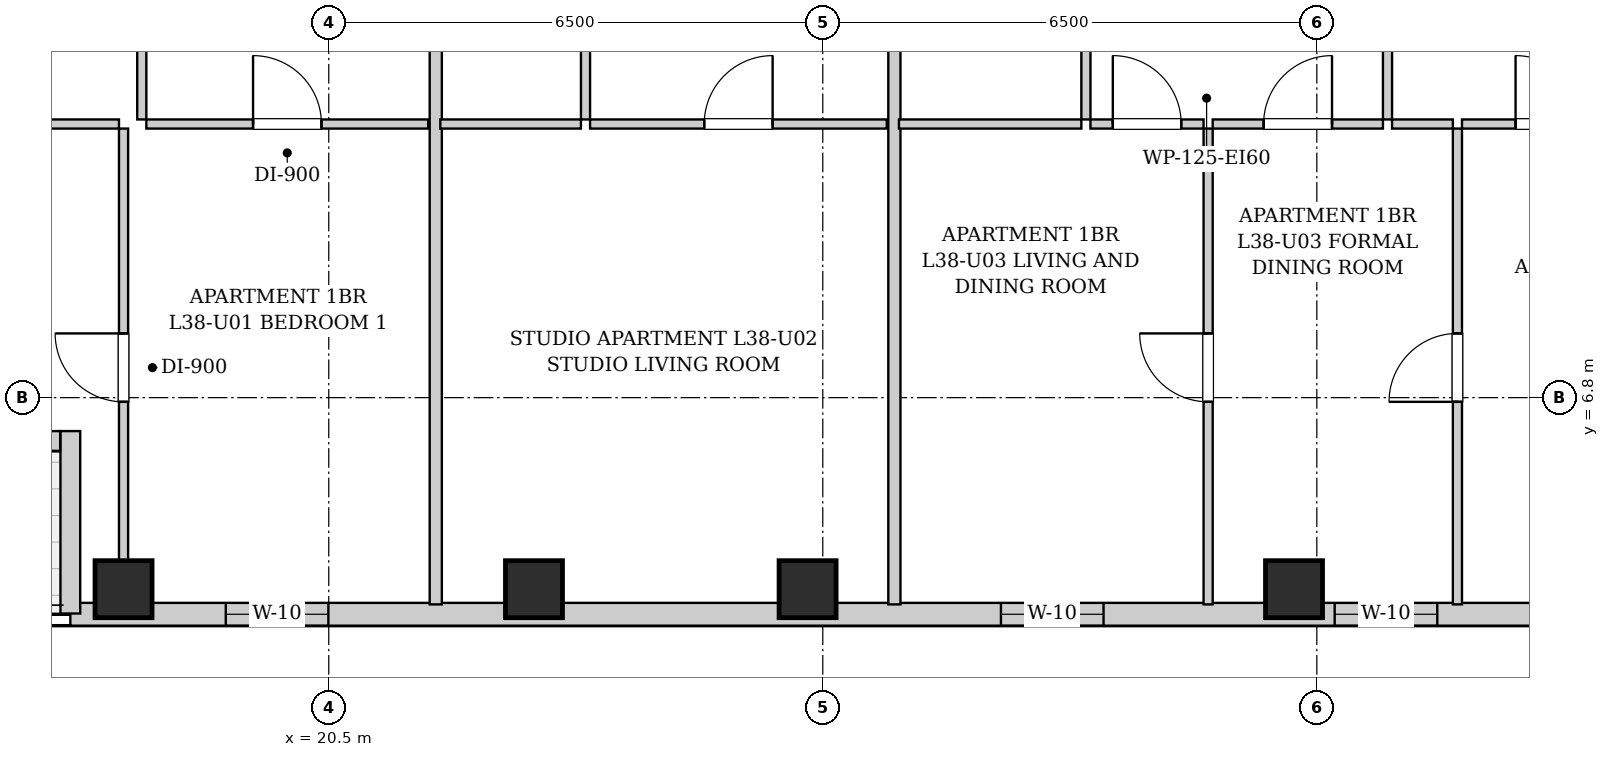
"""IFC4 building model, lengths in metres.
Left out: names, types, materials, properties, quantities, classifications, styles, units other than length and angle.
Written with IfcOpenShell. Run it as: python <this file> out.ifc"""

import sys

from ifc_helpers import new_model, si_unit, direction, frame, frame_2d, origin, origin_2d, place, context, subcontext, project, spatial, rectangle, extrude, element, fill, save


model = new_model("IFC4")
c1 = context("Model", 3, precision=1e-05, world=origin(), true_north=direction((0.0, 1.0)))
c2 = subcontext(c1, "Body", "Model", "MODEL_VIEW")
j1 = project(units=[si_unit("LENGTHUNIT", "METRE"), si_unit("PLANEANGLEUNIT", "RADIAN")], contexts=[c1])
p1 = place(None, origin())
s1 = spatial("IfcSite", under=j1, at=p1, CompositionType="ELEMENT")
p2 = place(p1, origin())
s2 = spatial("IfcBuilding", under=s1, at=p2, CompositionType="ELEMENT")
p3 = place(p2, frame((0.0, 0.0, 134.15)))
s3 = spatial("IfcBuildingStorey", under=s2, at=p3, CompositionType="ELEMENT", Elevation=134.15)
for number, where, z_axis, x_axis in (
    (1, (17.8, 4.28, 0.0), (0.0, 0.0, 1.0), (1.0, 0.0, 0.0)),
    (2, (23.2, 4.28, 0.0), (0.0, 0.0, 1.0), (1.0, 0.0, 0.0)),
    (3, (26.8, 4.28, 0.0), (0.0, 0.0, 1.0), (1.0, 0.0, 0.0)),
    (4, (33.2, 4.28, 0.0), (0.0, 0.0, 1.0), (1.0, 0.0, 0.0)),
):
    element("IfcColumn", number, at=place(p3, frame(where, z_axis=z_axis, x_axis=x_axis)), inside=s3, PredefinedType="COLUMN", context=c2, shape_type="SweptSolid", body=[
        extrude(rectangle(XDim=0.75, YDim=0.75, at=origin_2d()), origin(), (0.0, 0.0, 1.0), 3.25),
    ])
p4 = place(p3, frame((37.8, 3.95, 0.0), z_axis=(0.0, 0.0, 1.0), x_axis=(-1.0, 0.0, 0.0)))
e5 = element("IfcWall", 5, at=p4, inside=s3, PredefinedType="SOLIDWALL", context=c2, shape_type="SweptSolid", body=[
    extrude(rectangle(XDim=20.7, YDim=0.3, at=frame_2d((10.35, 0.0))), origin(), (0.0, 0.0, 1.0), 2.99),
])
p5 = place(p4, frame((17.305, 0.0, 0.55)))
e6 = element("IfcOpeningElement", 6, at=p5, cuts=e5, PredefinedType="OPENING", context=c2, shape_type="SweptSolid", body=[
    extrude(rectangle(XDim=1.35, YDim=1.2, at=frame_2d((0.675, 0.6))), frame((0.0, 0.16, 0.0), z_axis=(0.0, -1.0, 0.0), x_axis=(1.0, 0.0, 0.0)), (0.0, 0.0, 1.0), 0.32),
])
p6 = place(p4, frame((7.106, 0.0, 0.55)))
e7 = element("IfcOpeningElement", 7, at=p6, cuts=e5, PredefinedType="OPENING", context=c2, shape_type="SweptSolid", body=[
    extrude(rectangle(XDim=1.35, YDim=1.2, at=frame_2d((0.675, 0.6))), frame((0.0, 0.16, 0.0), z_axis=(0.0, -1.0, 0.0), x_axis=(1.0, 0.0, 0.0)), (0.0, 0.0, 1.0), 0.32),
])
p7 = place(p4, frame((2.715, 0.0, 0.55)))
e8 = element("IfcOpeningElement", 8, at=p7, cuts=e5, PredefinedType="OPENING", context=c2, shape_type="SweptSolid", body=[
    extrude(rectangle(XDim=1.35, YDim=1.2, at=frame_2d((0.675, 0.6))), frame((0.0, 0.16, 0.0), z_axis=(0.0, -1.0, 0.0), x_axis=(1.0, 0.0, 0.0)), (0.0, 0.0, 1.0), 0.32),
])
p8 = place(p3, frame((17.1, 3.96, 0.0), z_axis=(0.0, 0.0, 1.0), x_axis=(0.0, 1.0, 0.0)))
e9 = element("IfcWall", 9, at=p8, inside=s3, PredefinedType="SOLIDWALL", context=c2, shape_type="SweptSolid", body=[
    extrude(rectangle(XDim=2.4, YDim=0.26, at=frame_2d((1.2, 0.0))), origin(), (0.0, 0.0, 1.0), 2.99),
])
p9 = place(p3, frame((16.966, 6.23, 0.0), z_axis=(0.0, 0.0, 1.0), x_axis=(-1.0, 0.0, 0.0)))
e10 = element("IfcWall", 10, at=p9, inside=s3, PredefinedType="SOLIDWALL", context=c2, shape_type="SweptSolid", body=[
    extrude(rectangle(XDim=4.882, YDim=0.26, at=frame_2d((2.441, 0.0))), origin(), (0.0, 0.0, 1.0), 2.99),
])
p10 = place(p9, frame((1.891, 0.0, 0.0)))
e11 = element("IfcOpeningElement", 11, at=p10, cuts=e10, PredefinedType="OPENING", context=c2, shape_type="SweptSolid", body=[
    extrude(rectangle(XDim=1.1, YDim=2.0, at=frame_2d((0.55, 1.0))), frame((0.0, 0.14, 0.0), z_axis=(0.0, -1.0, 0.0), x_axis=(1.0, 0.0, 0.0)), (0.0, 0.0, 1.0), 0.28),
])
p11 = place(p9, frame((0.881, 0.0, 0.55)))
e12 = element("IfcOpeningElement", 12, at=p11, cuts=e10, PredefinedType="OPENING", context=c2, shape_type="SweptSolid", body=[
    extrude(rectangle(XDim=0.85, YDim=1.2, at=frame_2d((0.425, 0.6))), frame((0.0, 0.14, 0.0), z_axis=(0.0, -1.0, 0.0), x_axis=(1.0, 0.0, 0.0)), (0.0, 0.0, 1.0), 0.28),
])
p12 = place(p3, frame((18.04, 10.46, 0.0), z_axis=(0.0, 0.0, 1.0), x_axis=(0.0, 1.0, 0.0)))
e13 = element("IfcWall", 13, at=p12, inside=s3, PredefinedType="PARTITIONING", context=c2, shape_type="SweptSolid", body=[
    extrude(rectangle(XDim=2.85, YDim=0.12, at=frame_2d((1.425, 0.0))), origin(), (0.0, 0.0, 1.0), 2.99),
])
p13 = place(p12, frame((0.975, 0.0, 0.0)))
e14 = element("IfcOpeningElement", 14, at=p13, cuts=e13, PredefinedType="OPENING", context=c2, shape_type="SweptSolid", body=[
    extrude(rectangle(XDim=0.9, YDim=2.05, at=frame_2d((0.45, 1.025))), frame((0.0, 0.07, 0.0), z_axis=(0.0, -1.0, 0.0), x_axis=(1.0, 0.0, 0.0)), (0.0, 0.0, 1.0), 0.14),
])
p14 = place(p3, frame((13.8, 10.4, 0.0), z_axis=(0.0, 0.0, 1.0), x_axis=(1.0, 0.0, 0.0)))
e15 = element("IfcWall", 15, at=p14, inside=s3, PredefinedType="PARTITIONING", context=c2, shape_type="SweptSolid", body=[
    extrude(rectangle(XDim=3.94, YDim=0.12, at=frame_2d((1.97, 0.0))), origin(), (0.0, 0.0, 1.0), 2.99),
])
p15 = place(p14, frame((1.52, 0.0, 0.0)))
e16 = element("IfcOpeningElement", 16, at=p15, cuts=e15, PredefinedType="OPENING", context=c2, shape_type="SweptSolid", body=[
    extrude(rectangle(XDim=0.9, YDim=2.05, at=frame_2d((0.45, 1.025))), frame((0.0, 0.07, 0.0), z_axis=(0.0, -1.0, 0.0), x_axis=(1.0, 0.0, 0.0)), (0.0, 0.0, 1.0), 0.14),
])
p16 = place(p3, frame((18.1, 10.4, 0.0), z_axis=(0.0, 0.0, 1.0), x_axis=(1.0, 0.0, 0.0)))
e17 = element("IfcWall", 17, at=p16, inside=s3, PredefinedType="PARTITIONING", context=c2, shape_type="SweptSolid", body=[
    extrude(rectangle(XDim=3.708, YDim=0.12, at=frame_2d((1.854, 0.0))), origin(), (0.0, 0.0, 1.0), 2.99),
])
p17 = place(p16, frame((1.404, 0.0, 0.0)))
e18 = element("IfcOpeningElement", 18, at=p17, cuts=e17, PredefinedType="OPENING", context=c2, shape_type="SweptSolid", body=[
    extrude(rectangle(XDim=0.9, YDim=2.05, at=frame_2d((0.45, 1.025))), frame((0.0, 0.07, 0.0), z_axis=(0.0, -1.0, 0.0), x_axis=(1.0, 0.0, 0.0)), (0.0, 0.0, 1.0), 0.14),
])
p18 = place(p3, frame((17.8, 4.08, 0.0), z_axis=(0.0, 0.0, 1.0), x_axis=(0.0, 1.0, 0.0)))
e19 = element("IfcWall", 19, at=p18, inside=s3, PredefinedType="PARTITIONING", context=c2, shape_type="SweptSolid", body=[
    extrude(rectangle(XDim=6.26, YDim=0.12, at=frame_2d((3.13, 0.0))), origin(), (0.0, 0.0, 1.0), 2.426),
])
p19 = place(p18, frame((2.665, 0.0, 0.0)))
e20 = element("IfcOpeningElement", 20, at=p19, cuts=e19, PredefinedType="OPENING", context=c2, shape_type="SweptSolid", body=[
    extrude(rectangle(XDim=0.9, YDim=2.05, at=frame_2d((0.45, 1.025))), frame((0.0, 0.07, 0.0), z_axis=(0.0, -1.0, 0.0), x_axis=(1.0, 0.0, 0.0)), (0.0, 0.0, 1.0), 0.14),
])
p20 = place(p3, frame((21.908, 4.08, 0.0), z_axis=(0.0, 0.0, 1.0), x_axis=(0.0, 1.0, 0.0)))
e21 = element("IfcWall", 21, at=p20, inside=s3, PredefinedType="PARTITIONING", context=c2, shape_type="SweptSolid", body=[
    extrude(rectangle(XDim=9.23, YDim=0.16, at=frame_2d((4.615, 0.0))), origin(), (0.0, 0.0, 1.0), 2.99),
])
p21 = place(p3, frame((23.878, 10.46, 0.0), z_axis=(0.0, 0.0, 1.0), x_axis=(0.0, 1.0, 0.0)))
e22 = element("IfcWall", 22, at=p21, inside=s3, PredefinedType="PARTITIONING", context=c2, shape_type="SweptSolid", body=[
    extrude(rectangle(XDim=2.85, YDim=0.12, at=frame_2d((1.425, 0.0))), origin(), (0.0, 0.0, 1.0), 2.99),
])
p22 = place(p21, frame((0.995, 0.0, 0.0)))
e23 = element("IfcOpeningElement", 23, at=p22, cuts=e22, PredefinedType="OPENING", context=c2, shape_type="SweptSolid", body=[
    extrude(rectangle(XDim=0.86, YDim=2.05, at=frame_2d((0.43, 1.025))), frame((0.0, 0.07, 0.0), z_axis=(0.0, -1.0, 0.0), x_axis=(1.0, 0.0, 0.0)), (0.0, 0.0, 1.0), 0.14),
])
p23 = place(p3, frame((21.968, 10.4, 0.0), z_axis=(0.0, 0.0, 1.0), x_axis=(1.0, 0.0, 0.0)))
e24 = element("IfcWall", 24, at=p23, inside=s3, PredefinedType="PARTITIONING", context=c2, shape_type="SweptSolid", body=[
    extrude(rectangle(XDim=1.85, YDim=0.12, at=frame_2d((0.925, 0.0))), origin(), (0.0, 0.0, 1.0), 2.99),
])
p24 = place(p3, frame((23.938, 10.4, 0.0), z_axis=(0.0, 0.0, 1.0), x_axis=(1.0, 0.0, 0.0)))
e25 = element("IfcWall", 25, at=p24, inside=s3, PredefinedType="PARTITIONING", context=c2, shape_type="SweptSolid", body=[
    extrude(rectangle(XDim=3.904, YDim=0.12, at=frame_2d((1.952, 0.0))), origin(), (0.0, 0.0, 1.0), 2.99),
])
p25 = place(p24, frame((1.502, 0.0, 0.0)))
e26 = element("IfcOpeningElement", 26, at=p25, cuts=e25, PredefinedType="OPENING", context=c2, shape_type="SweptSolid", body=[
    extrude(rectangle(XDim=0.9, YDim=2.05, at=frame_2d((0.45, 1.025))), frame((0.0, 0.07, 0.0), z_axis=(0.0, -1.0, 0.0), x_axis=(1.0, 0.0, 0.0)), (0.0, 0.0, 1.0), 0.14),
])
p26 = place(p3, frame((27.942, 4.08, 0.0), z_axis=(0.0, 0.0, 1.0), x_axis=(0.0, 1.0, 0.0)))
e27 = element("IfcWall", 27, at=p26, inside=s3, PredefinedType="PARTITIONING", context=c2, shape_type="SweptSolid", body=[
    extrude(rectangle(XDim=9.23, YDim=0.16, at=frame_2d((4.615, 0.0))), origin(), (0.0, 0.0, 1.0), 2.99),
])
p27 = place(p3, frame((30.462, 10.46, 0.0), z_axis=(0.0, 0.0, 1.0), x_axis=(0.0, 1.0, 0.0)))
e28 = element("IfcWall", 28, at=p27, inside=s3, PredefinedType="PARTITIONING", context=c2, shape_type="SweptSolid", body=[
    extrude(rectangle(XDim=2.85, YDim=0.12, at=frame_2d((1.425, 0.0))), origin(), (0.0, 0.0, 1.0), 2.99),
])
p28 = place(p27, frame((0.995, 0.0, 0.0)))
e29 = element("IfcOpeningElement", 29, at=p28, cuts=e28, PredefinedType="OPENING", context=c2, shape_type="SweptSolid", body=[
    extrude(rectangle(XDim=0.86, YDim=2.05, at=frame_2d((0.43, 1.025))), frame((0.0, 0.07, 0.0), z_axis=(0.0, -1.0, 0.0), x_axis=(1.0, 0.0, 0.0)), (0.0, 0.0, 1.0), 0.14),
])
p29 = place(p3, frame((28.002, 10.4, 0.0), z_axis=(0.0, 0.0, 1.0), x_axis=(1.0, 0.0, 0.0)))
e30 = element("IfcWall", 30, at=p29, inside=s3, PredefinedType="PARTITIONING", context=c2, shape_type="SweptSolid", body=[
    extrude(rectangle(XDim=2.4, YDim=0.12, at=frame_2d((1.2, 0.0))), origin(), (0.0, 0.0, 1.0), 2.99),
])
p30 = place(p3, frame((34.43, 10.46, 0.0), z_axis=(0.0, 0.0, 1.0), x_axis=(0.0, 1.0, 0.0)))
e31 = element("IfcWall", 31, at=p30, inside=s3, PredefinedType="PARTITIONING", context=c2, shape_type="SweptSolid", body=[
    extrude(rectangle(XDim=2.85, YDim=0.12, at=frame_2d((1.425, 0.0))), origin(), (0.0, 0.0, 1.0), 2.99),
])
p31 = place(p30, frame((0.975, 0.0, 0.0)))
e32 = element("IfcOpeningElement", 32, at=p31, cuts=e31, PredefinedType="OPENING", context=c2, shape_type="SweptSolid", body=[
    extrude(rectangle(XDim=0.9, YDim=2.05, at=frame_2d((0.45, 1.025))), frame((0.0, 0.07, 0.0), z_axis=(0.0, -1.0, 0.0), x_axis=(1.0, 0.0, 0.0)), (0.0, 0.0, 1.0), 0.14),
])
p32 = place(p3, frame((30.522, 10.4, 0.0), z_axis=(0.0, 0.0, 1.0), x_axis=(1.0, 0.0, 0.0)))
e33 = element("IfcWall", 33, at=p32, inside=s3, PredefinedType="PARTITIONING", context=c2, shape_type="SweptSolid", body=[
    extrude(rectangle(XDim=1.488, YDim=0.12, at=frame_2d((0.744, 0.0))), origin(), (0.0, 0.0, 1.0), 2.99),
])
p33 = place(p32, frame((0.294, 0.0, 0.0)))
e34 = element("IfcOpeningElement", 34, at=p33, cuts=e33, PredefinedType="OPENING", context=c2, shape_type="SweptSolid", body=[
    extrude(rectangle(XDim=0.9, YDim=2.05, at=frame_2d((0.45, 1.025))), frame((0.0, 0.07, 0.0), z_axis=(0.0, -1.0, 0.0), x_axis=(1.0, 0.0, 0.0)), (0.0, 0.0, 1.0), 0.14),
])
p34 = place(p3, frame((32.13, 10.4, 0.0), z_axis=(0.0, 0.0, 1.0), x_axis=(1.0, 0.0, 0.0)))
e35 = element("IfcWall", 35, at=p34, inside=s3, PredefinedType="PARTITIONING", context=c2, shape_type="SweptSolid", body=[
    extrude(rectangle(XDim=2.24, YDim=0.12, at=frame_2d((1.12, 0.0))), origin(), (0.0, 0.0, 1.0), 2.99),
])
p35 = place(p34, frame((0.67, 0.0, 0.0)))
e36 = element("IfcOpeningElement", 36, at=p35, cuts=e35, PredefinedType="OPENING", context=c2, shape_type="SweptSolid", body=[
    extrude(rectangle(XDim=0.9, YDim=2.05, at=frame_2d((0.45, 1.025))), frame((0.0, 0.07, 0.0), z_axis=(0.0, -1.0, 0.0), x_axis=(1.0, 0.0, 0.0)), (0.0, 0.0, 1.0), 0.14),
])
p36 = place(p3, frame((34.49, 10.4, 0.0), z_axis=(0.0, 0.0, 1.0), x_axis=(1.0, 0.0, 0.0)))
e37 = element("IfcWall", 37, at=p36, inside=s3, PredefinedType="PARTITIONING", context=c2, shape_type="SweptSolid", body=[
    extrude(rectangle(XDim=0.8, YDim=0.12, at=frame_2d((0.4, 0.0))), origin(), (0.0, 0.0, 1.0), 2.99),
])
p37 = place(p3, frame((35.41, 10.4, 0.0), z_axis=(0.0, 0.0, 1.0), x_axis=(1.0, 0.0, 0.0)))
e38 = element("IfcWall", 38, at=p37, inside=s3, PredefinedType="PARTITIONING", context=c2, shape_type="SweptSolid", body=[
    extrude(rectangle(XDim=2.31, YDim=0.12, at=frame_2d((1.155, 0.0))), origin(), (0.0, 0.0, 1.0), 2.99),
])
p38 = place(p37, frame((0.705, 0.0, 0.0)))
e39 = element("IfcOpeningElement", 39, at=p38, cuts=e38, PredefinedType="OPENING", context=c2, shape_type="SweptSolid", body=[
    extrude(rectangle(XDim=0.9, YDim=2.05, at=frame_2d((0.45, 1.025))), frame((0.0, 0.07, 0.0), z_axis=(0.0, -1.0, 0.0), x_axis=(1.0, 0.0, 0.0)), (0.0, 0.0, 1.0), 0.14),
])
p39 = place(p3, frame((32.07, 4.08, 0.0), z_axis=(0.0, 0.0, 1.0), x_axis=(0.0, 1.0, 0.0)))
e40 = element("IfcWall", 40, at=p39, inside=s3, PredefinedType="PARTITIONING", context=c2, shape_type="SweptSolid", body=[
    extrude(rectangle(XDim=6.26, YDim=0.12, at=frame_2d((3.13, 0.0))), origin(), (0.0, 0.0, 1.0), 2.99),
])
p40 = place(p39, frame((2.665, 0.0, 0.0)))
e41 = element("IfcOpeningElement", 41, at=p40, cuts=e40, PredefinedType="OPENING", context=c2, shape_type="SweptSolid", body=[
    extrude(rectangle(XDim=0.9, YDim=2.05, at=frame_2d((0.45, 1.025))), frame((0.0, 0.07, 0.0), z_axis=(0.0, -1.0, 0.0), x_axis=(1.0, 0.0, 0.0)), (0.0, 0.0, 1.0), 0.14),
])
p41 = place(p3, frame((35.35, 4.08, 0.0), z_axis=(0.0, 0.0, 1.0), x_axis=(0.0, 1.0, 0.0)))
e42 = element("IfcWall", 42, at=p41, inside=s3, PredefinedType="PARTITIONING", context=c2, shape_type="SweptSolid", body=[
    extrude(rectangle(XDim=6.26, YDim=0.12, at=frame_2d((3.13, 0.0))), origin(), (0.0, 0.0, 1.0), 2.99),
])
p42 = place(p41, frame((2.665, 0.0, 0.0)))
e43 = element("IfcOpeningElement", 43, at=p42, cuts=e42, PredefinedType="OPENING", context=c2, shape_type="SweptSolid", body=[
    extrude(rectangle(XDim=0.9, YDim=2.05, at=frame_2d((0.45, 1.025))), frame((0.0, 0.07, 0.0), z_axis=(0.0, -1.0, 0.0), x_axis=(1.0, 0.0, 0.0)), (0.0, 0.0, 1.0), 0.14),
])
p43 = place(p17, origin())
e44 = element("IfcDoor", 44, at=p43, inside=s3, OperationType="SINGLE_SWING_LEFT", PredefinedType="DOOR", context=c2, shape_type="SweptSolid", body=[
    extrude(rectangle(XDim=0.9, YDim=2.05, at=frame_2d((0.45, 1.025))), frame((0.0, 0.025, 0.0), z_axis=(0.0, -1.0, 0.0), x_axis=(1.0, 0.0, 0.0)), (0.0, 0.0, 1.0), 0.05),
])
fill(e18, e44)
p44 = place(p19, origin())
e45 = element("IfcDoor", 45, at=p44, inside=s3, OperationType="SINGLE_SWING_RIGHT", PredefinedType="DOOR", context=c2, shape_type="SweptSolid", body=[
    extrude(rectangle(XDim=0.9, YDim=2.05, at=frame_2d((0.45, 1.025))), frame((0.0, 0.025, 0.0), z_axis=(0.0, -1.0, 0.0), x_axis=(1.0, 0.0, 0.0)), (0.0, 0.0, 1.0), 0.05),
])
fill(e20, e45)
p45 = place(p25, origin())
e46 = element("IfcDoor", 46, at=p45, inside=s3, OperationType="SINGLE_SWING_RIGHT", PredefinedType="DOOR", context=c2, shape_type="SweptSolid", body=[
    extrude(rectangle(XDim=0.9, YDim=2.05, at=frame_2d((0.45, 1.025))), frame((0.0, 0.025, 0.0), z_axis=(0.0, -1.0, 0.0), x_axis=(1.0, 0.0, 0.0)), (0.0, 0.0, 1.0), 0.05),
])
fill(e26, e46)
p46 = place(p33, origin())
e47 = element("IfcDoor", 47, at=p46, inside=s3, OperationType="SINGLE_SWING_LEFT", PredefinedType="DOOR", context=c2, shape_type="SweptSolid", body=[
    extrude(rectangle(XDim=0.9, YDim=2.05, at=frame_2d((0.45, 1.025))), frame((0.0, 0.025, 0.0), z_axis=(0.0, -1.0, 0.0), x_axis=(1.0, 0.0, 0.0)), (0.0, 0.0, 1.0), 0.05),
])
fill(e34, e47)
p47 = place(p35, origin())
e48 = element("IfcDoor", 48, at=p47, inside=s3, OperationType="SINGLE_SWING_RIGHT", PredefinedType="DOOR", context=c2, shape_type="SweptSolid", body=[
    extrude(rectangle(XDim=0.9, YDim=2.05, at=frame_2d((0.45, 1.025))), frame((0.0, 0.025, 0.0), z_axis=(0.0, -1.0, 0.0), x_axis=(1.0, 0.0, 0.0)), (0.0, 0.0, 1.0), 0.05),
])
fill(e36, e48)
p48 = place(p38, origin())
e49 = element("IfcDoor", 49, at=p48, inside=s3, OperationType="SINGLE_SWING_LEFT", PredefinedType="DOOR", context=c2, shape_type="SweptSolid", body=[
    extrude(rectangle(XDim=0.9, YDim=2.05, at=frame_2d((0.45, 1.025))), frame((0.0, 0.025, 0.0), z_axis=(0.0, -1.0, 0.0), x_axis=(1.0, 0.0, 0.0)), (0.0, 0.0, 1.0), 0.05),
])
fill(e39, e49)
p49 = place(p40, origin())
e50 = element("IfcDoor", 50, at=p49, inside=s3, OperationType="SINGLE_SWING_RIGHT", PredefinedType="DOOR", context=c2, shape_type="SweptSolid", body=[
    extrude(rectangle(XDim=0.9, YDim=2.05, at=frame_2d((0.45, 1.025))), frame((0.0, 0.025, 0.0), z_axis=(0.0, -1.0, 0.0), x_axis=(1.0, 0.0, 0.0)), (0.0, 0.0, 1.0), 0.05),
])
fill(e41, e50)
p50 = place(p42, origin())
e51 = element("IfcDoor", 51, at=p50, inside=s3, OperationType="SINGLE_SWING_LEFT", PredefinedType="DOOR", context=c2, shape_type="SweptSolid", body=[
    extrude(rectangle(XDim=0.9, YDim=2.05, at=frame_2d((0.45, 1.025))), frame((0.0, 0.025, 0.0), z_axis=(0.0, -1.0, 0.0), x_axis=(1.0, 0.0, 0.0)), (0.0, 0.0, 1.0), 0.05),
])
fill(e43, e51)
p51 = place(p5, origin())
e52 = element("IfcWindow", 52, at=p51, inside=s3, PartitioningType="SINGLE_PANEL", PredefinedType="WINDOW", context=c2, shape_type="SweptSolid", body=[
    extrude(rectangle(XDim=1.35, YDim=1.2, at=frame_2d((0.675, 0.6))), frame((0.0, 0.03, 0.0), z_axis=(0.0, -1.0, 0.0), x_axis=(1.0, 0.0, 0.0)), (0.0, 0.0, 1.0), 0.06),
])
fill(e6, e52)
p52 = place(p6, origin())
e53 = element("IfcWindow", 53, at=p52, inside=s3, PartitioningType="SINGLE_PANEL", PredefinedType="WINDOW", context=c2, shape_type="SweptSolid", body=[
    extrude(rectangle(XDim=1.35, YDim=1.2, at=frame_2d((0.675, 0.6))), frame((0.0, 0.03, 0.0), z_axis=(0.0, -1.0, 0.0), x_axis=(1.0, 0.0, 0.0)), (0.0, 0.0, 1.0), 0.06),
])
fill(e7, e53)
p53 = place(p7, origin())
e54 = element("IfcWindow", 54, at=p53, inside=s3, PartitioningType="SINGLE_PANEL", PredefinedType="WINDOW", context=c2, shape_type="SweptSolid", body=[
    extrude(rectangle(XDim=1.35, YDim=1.2, at=frame_2d((0.675, 0.6))), frame((0.0, 0.03, 0.0), z_axis=(0.0, -1.0, 0.0), x_axis=(1.0, 0.0, 0.0)), (0.0, 0.0, 1.0), 0.06),
])
fill(e8, e54)
save(model, sys.argv[1])
